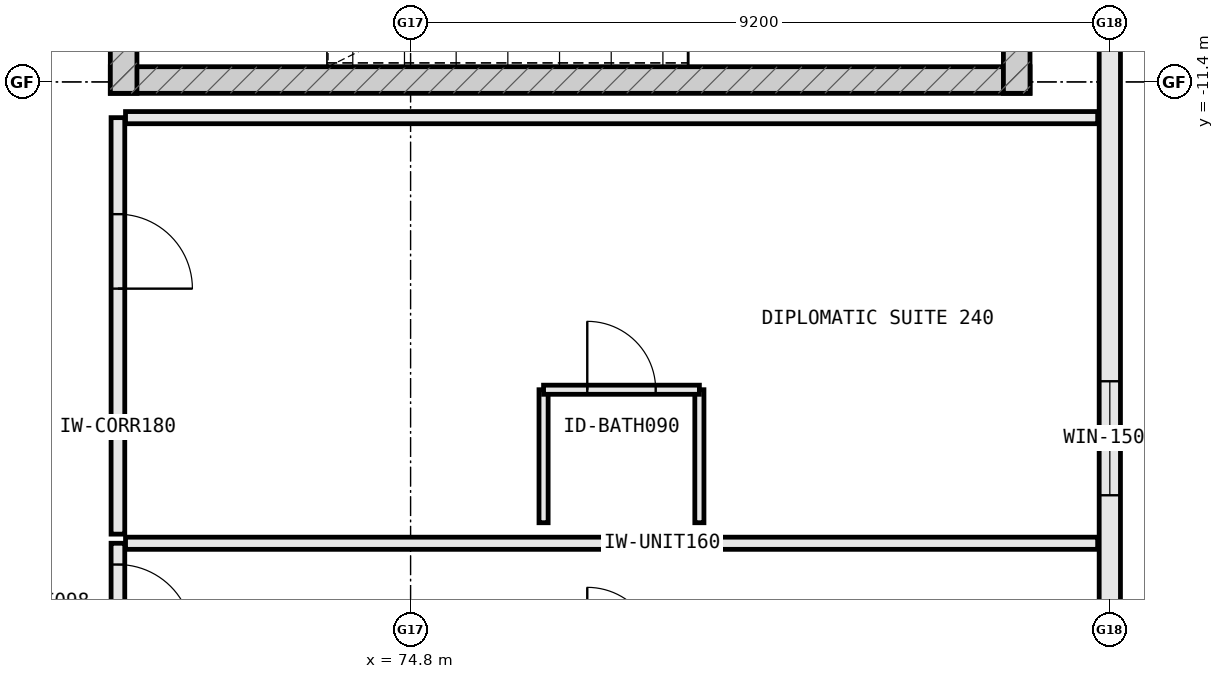
"""IFC4 building model, lengths in metres.
Left out: names, types, materials, properties, quantities, classifications, styles, units other than length and angle.
Written with IfcOpenShell. Run it as: python <this file> out.ifc"""

import sys

from ifc_helpers import new_model, si_unit, direction, frame, frame_2d, origin, place, context, subcontext, project, spatial, rectangle, extrude, element, fill, save


model = new_model("IFC4")
c1 = context("Model", 3, precision=1e-05, world=origin(), true_north=direction((0.0, 1.0)))
c2 = subcontext(c1, "Body", "Model", "MODEL_VIEW")
j1 = project(units=[si_unit("LENGTHUNIT", "METRE"), si_unit("PLANEANGLEUNIT", "RADIAN")], contexts=[c1])
p1 = place(None, origin())
s1 = spatial("IfcSite", under=j1, at=p1, CompositionType="ELEMENT")
p2 = place(p1, origin())
s2 = spatial("IfcBuilding", under=s1, at=p2, CompositionType="ELEMENT")
p3 = place(p2, frame((0.0, 0.0, 35.2)))
s3 = spatial("IfcBuildingStorey", under=s2, at=p3, CompositionType="ELEMENT", Elevation=35.2)
p4 = place(p3, frame((84.0, -18.377, 0.0), z_axis=(0.0, 0.0, 1.0), x_axis=(0.0, 1.0, 0.0)))
e1 = element("IfcWall", 1, at=p4, inside=s3, PredefinedType="STANDARD", context=c2, shape_type="SweptSolid", body=[
    extrude(rectangle(XDim=9.154, YDim=0.28, at=frame_2d((4.577, 0.0))), origin(), (0.0, 0.0, 1.0), 2.98),
])
p5 = place(p4, frame((1.539, 0.0, 0.85)))
e2 = element("IfcOpeningElement", 2, at=p5, cuts=e1, PredefinedType="OPENING", context=c2, shape_type="SweptSolid", body=[
    extrude(rectangle(XDim=1.5, YDim=1.75, at=frame_2d((0.75, 0.875))), frame((0.0, 0.152, 0.0), z_axis=(0.0, -1.0, 0.0), x_axis=(1.0, 0.0, 0.0)), (0.0, 0.0, 1.0), 0.304),
])
p6 = place(p3, frame((70.85, -11.375, 0.0), z_axis=(0.0, 0.0, 1.0), x_axis=(1.0, 0.0, 0.0)))
e3 = element("IfcWall", 3, at=p6, inside=s3, PredefinedType="SHEAR", context=c2, shape_type="SweptSolid", body=[
    extrude(rectangle(XDim=12.1, YDim=0.35, at=frame_2d((6.05, 0.0))), origin(), (0.0, 0.0, 1.0), 3.8),
])
p7 = place(p3, frame((82.775, -11.55, 0.0), z_axis=(0.0, 0.0, 1.0), x_axis=(0.0, 1.0, 0.0)))
e4 = element("IfcWall", 4, at=p7, inside=s3, PredefinedType="SHEAR", context=c2, shape_type="SweptSolid", body=[
    extrude(rectangle(XDim=5.1, YDim=0.35, at=frame_2d((2.55, 0.0))), origin(), (0.0, 0.0, 1.0), 3.8),
])
p8 = place(p3, frame((71.025, -6.45, 0.0), z_axis=(0.0, 0.0, 1.0), x_axis=(0.0, -1.0, 0.0)))
e5 = element("IfcWall", 5, at=p8, inside=s3, PredefinedType="SHEAR", context=c2, shape_type="SweptSolid", body=[
    extrude(rectangle(XDim=5.1, YDim=0.35, at=frame_2d((2.55, 0.0))), origin(), (0.0, 0.0, 1.0), 3.8),
])
p9 = place(p8, frame((2.0, 0.0, 0.0)))
e6 = element("IfcOpeningElement", 6, at=p9, cuts=e5, PredefinedType="OPENING", context=c2, shape_type="SweptSolid", body=[
    extrude(rectangle(XDim=1.1, YDim=2.2, at=frame_2d((0.55, 1.1))), frame((0.0, 0.187, 0.0), z_axis=(0.0, -1.0, 0.0), x_axis=(1.0, 0.0, 0.0)), (0.0, 0.0, 1.0), 0.374),
])
p10 = place(p3, frame((70.95, -17.47, 0.0), z_axis=(0.0, 0.0, 1.0), x_axis=(0.0, -1.0, 0.0)))
e7 = element("IfcWall", 7, at=p10, inside=s3, PredefinedType="PARTITIONING", context=c2, shape_type="SweptSolid", body=[
    extrude(rectangle(XDim=3.38, YDim=0.18, at=frame_2d((1.69, 0.0))), origin(), (0.0, 0.0, 1.0), 3.565),
])
p11 = place(p10, frame((0.28, 0.0, 0.0)))
e8 = element("IfcOpeningElement", 8, at=p11, cuts=e7, PredefinedType="OPENING", context=c2, shape_type="SweptSolid", body=[
    extrude(rectangle(XDim=0.98, YDim=2.18, at=frame_2d((0.49, 1.09))), frame((0.0, 0.102, 0.0), z_axis=(0.0, -1.0, 0.0), x_axis=(1.0, 0.0, 0.0)), (0.0, 0.0, 1.0), 0.204),
])
p12 = place(p3, frame((71.05, -17.47, 0.0), z_axis=(0.0, 0.0, 1.0), x_axis=(1.0, 0.0, 0.0)))
e9 = element("IfcWall", 9, at=p12, inside=s3, PredefinedType="PARTITIONING", context=c2, shape_type="SweptSolid", body=[
    extrude(rectangle(XDim=12.79, YDim=0.16, at=frame_2d((6.395, 0.0))), origin(), (0.0, 0.0, 1.0), 3.565),
])
p13 = place(p3, frame((70.95, -11.87, 0.0), z_axis=(0.0, 0.0, 1.0), x_axis=(0.0, -1.0, 0.0)))
e10 = element("IfcWall", 10, at=p13, inside=s3, PredefinedType="PARTITIONING", context=c2, shape_type="SweptSolid", body=[
    extrude(rectangle(XDim=5.48, YDim=0.18, at=frame_2d((2.74, 0.0))), origin(), (0.0, 0.0, 1.0), 3.565),
])
p14 = place(p13, frame((1.27, 0.0, 0.0)))
e11 = element("IfcOpeningElement", 11, at=p14, cuts=e10, PredefinedType="OPENING", context=c2, shape_type="SweptSolid", body=[
    extrude(rectangle(XDim=0.98, YDim=2.18, at=frame_2d((0.49, 1.09))), frame((0.0, 0.102, 0.0), z_axis=(0.0, -1.0, 0.0), x_axis=(1.0, 0.0, 0.0)), (0.0, 0.0, 1.0), 0.204),
])
p15 = place(p3, frame((71.05, -11.87, 0.0), z_axis=(0.0, 0.0, 1.0), x_axis=(1.0, 0.0, 0.0)))
e12 = element("IfcWall", 12, at=p15, inside=s3, PredefinedType="PARTITIONING", context=c2, shape_type="SweptSolid", body=[
    extrude(rectangle(XDim=12.79, YDim=0.16, at=frame_2d((6.395, 0.0))), origin(), (0.0, 0.0, 1.0), 3.565),
])
for number, where, z_axis, x_axis in (
    (13, (76.55, -17.2, 0.0), (0.0, 0.0, 1.0), (0.0, 1.0, 0.0)),
    (14, (78.6, -17.2, 0.0), (0.0, 0.0, 1.0), (0.0, 1.0, 0.0)),
):
    element("IfcWall", number, at=place(p3, frame(where, z_axis=z_axis, x_axis=x_axis)), inside=s3, PredefinedType="PARTITIONING", context=c2, shape_type="SweptSolid", body=[
        extrude(rectangle(XDim=1.75, YDim=0.12, at=frame_2d((0.875, 0.0))), origin(), (0.0, 0.0, 1.0), 3.565),
    ])
p16 = place(p3, frame((76.55, -15.45, 0.0), z_axis=(0.0, 0.0, 1.0), x_axis=(1.0, 0.0, 0.0)))
e15 = element("IfcWall", 15, at=p16, inside=s3, PredefinedType="PARTITIONING", context=c2, shape_type="SweptSolid", body=[
    extrude(rectangle(XDim=2.05, YDim=0.12, at=frame_2d((1.025, 0.0))), origin(), (0.0, 0.0, 1.0), 3.565),
])
p17 = place(p16, frame((0.575, 0.0, 0.0)))
e16 = element("IfcOpeningElement", 16, at=p17, cuts=e15, PredefinedType="OPENING", context=c2, shape_type="SweptSolid", body=[
    extrude(rectangle(XDim=0.9, YDim=2.15, at=frame_2d((0.45, 1.075))), frame((0.0, 0.072, 0.0), z_axis=(0.0, -1.0, 0.0), x_axis=(1.0, 0.0, 0.0)), (0.0, 0.0, 1.0), 0.144),
])
p18 = place(p5, origin())
e17 = element("IfcWindow", 17, at=p18, inside=s3, PartitioningType="SINGLE_PANEL", PredefinedType="WINDOW", context=c2, shape_type="SweptSolid", body=[
    extrude(rectangle(XDim=1.5, YDim=1.75, at=frame_2d((0.75, 0.875))), frame((0.0, 0.03, 0.0), z_axis=(0.0, -1.0, 0.0), x_axis=(1.0, 0.0, 0.0)), (0.0, 0.0, 1.0), 0.06),
])
fill(e2, e17)
p19 = place(p11, origin())
e18 = element("IfcDoor", 18, at=p19, inside=s3, OperationType="SINGLE_SWING_RIGHT", PredefinedType="DOOR", context=c2, shape_type="SweptSolid", body=[
    extrude(rectangle(XDim=0.98, YDim=2.18, at=frame_2d((0.49, 1.09))), frame((0.0, 0.025, 0.0), z_axis=(0.0, -1.0, 0.0), x_axis=(1.0, 0.0, 0.0)), (0.0, 0.0, 1.0), 0.05),
])
fill(e8, e18)
p20 = place(p14, origin())
e19 = element("IfcDoor", 19, at=p20, inside=s3, OperationType="SINGLE_SWING_RIGHT", PredefinedType="DOOR", context=c2, shape_type="SweptSolid", body=[
    extrude(rectangle(XDim=0.98, YDim=2.18, at=frame_2d((0.49, 1.09))), frame((0.0, 0.025, 0.0), z_axis=(0.0, -1.0, 0.0), x_axis=(1.0, 0.0, 0.0)), (0.0, 0.0, 1.0), 0.05),
])
fill(e11, e19)
p21 = place(p17, origin())
e20 = element("IfcDoor", 20, at=p21, inside=s3, OperationType="SINGLE_SWING_LEFT", PredefinedType="DOOR", context=c2, shape_type="SweptSolid", body=[
    extrude(rectangle(XDim=0.9, YDim=2.15, at=frame_2d((0.45, 1.075))), frame((0.0, 0.025, 0.0), z_axis=(0.0, -1.0, 0.0), x_axis=(1.0, 0.0, 0.0)), (0.0, 0.0, 1.0), 0.05),
])
fill(e16, e20)
save(model, sys.argv[1])
